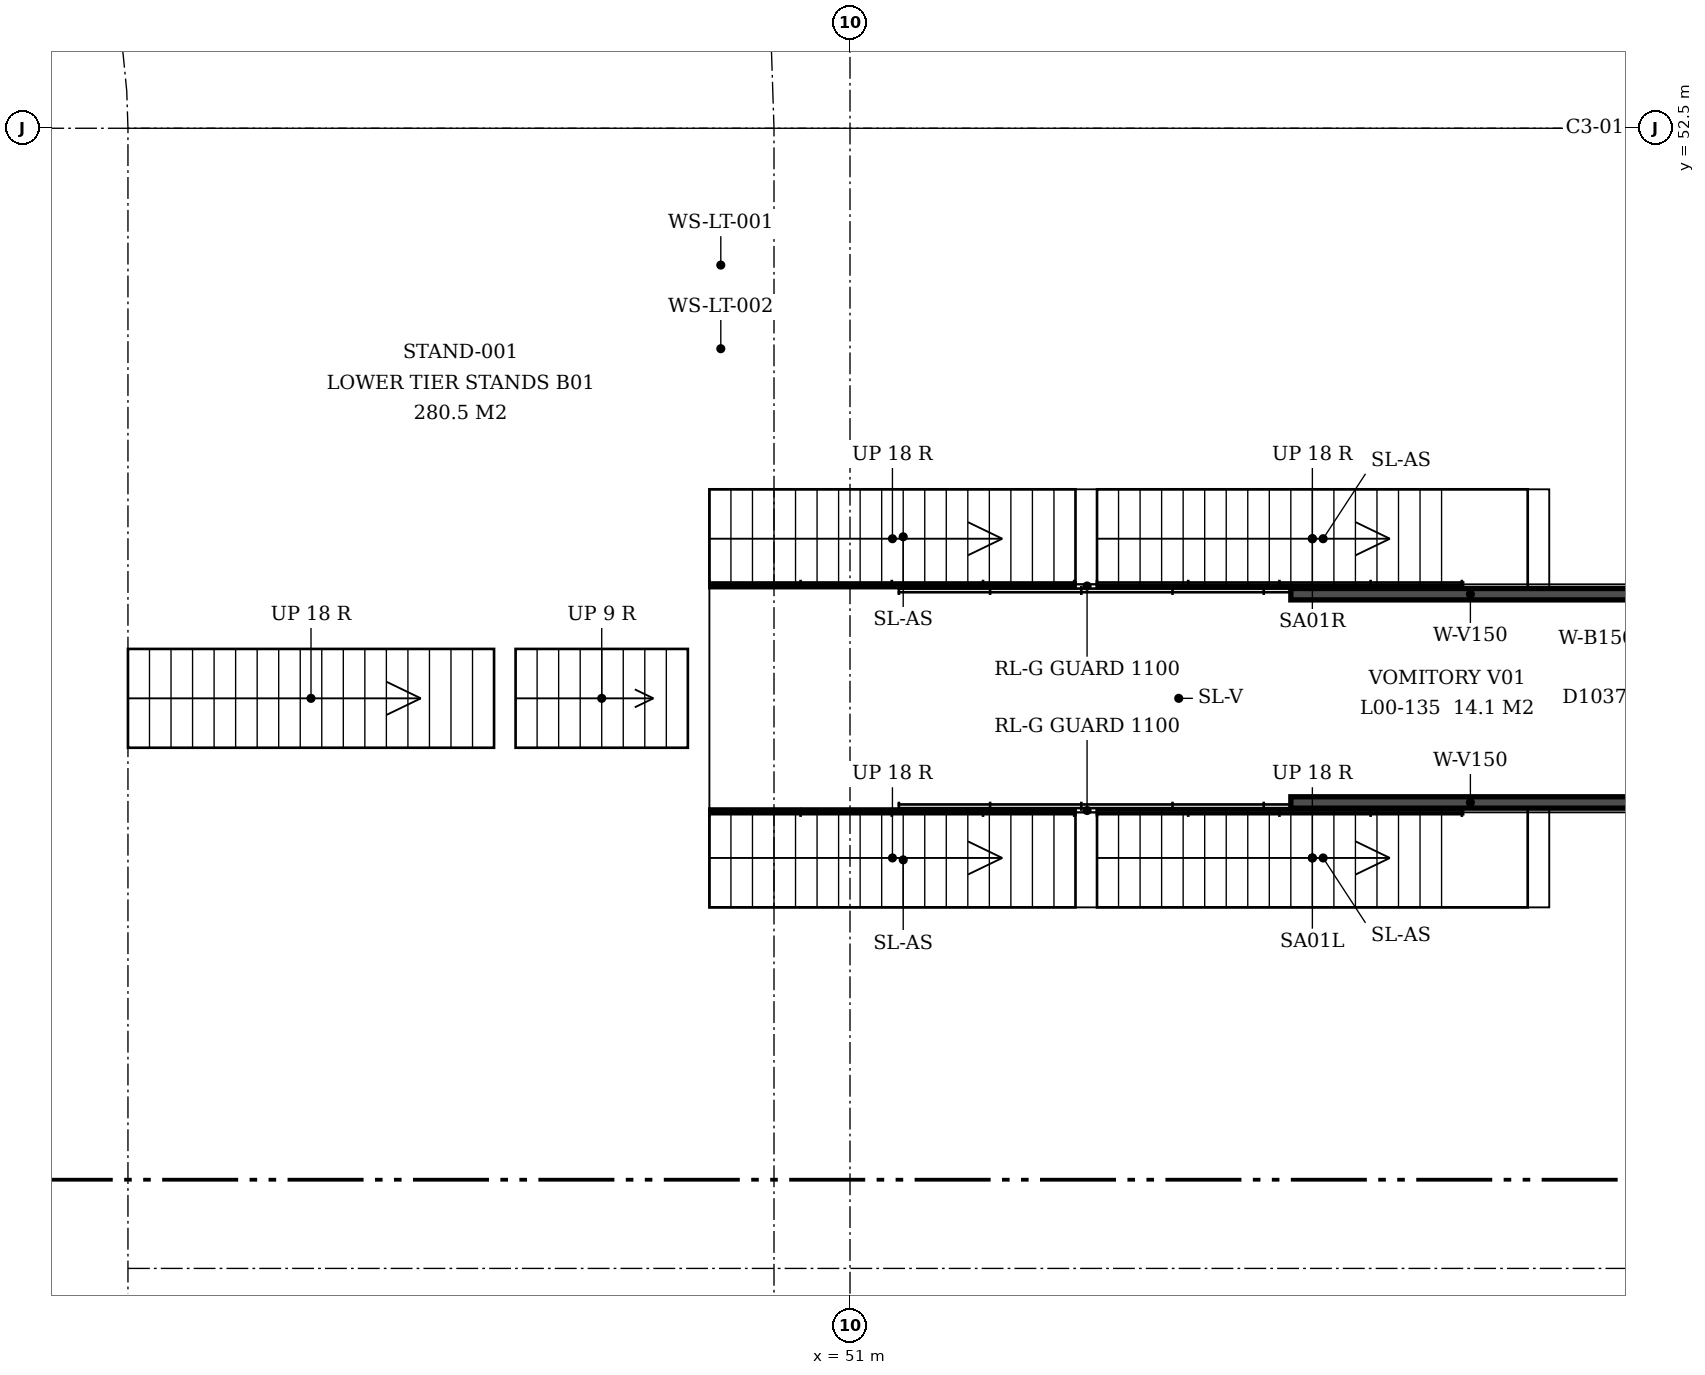
"""IFC4 building model, lengths in metres.
Left out: names, types, materials, properties, quantities, classifications, styles, units other than length and angle.
Written with IfcOpenShell. Run it as: python <this file> out.ifc"""

import sys

from ifc_helpers import new_model, si_unit, direction, frame, frame_2d, origin, place, context, subcontext, project, spatial, rectangle, extrude, element, save


model = new_model("IFC4")
c1 = context("Model", 3, precision=1e-05, world=origin(), true_north=direction((0.0, 1.0)))
c2 = subcontext(c1, "Body", "Model", "MODEL_VIEW")
j1 = project(units=[si_unit("LENGTHUNIT", "METRE"), si_unit("PLANEANGLEUNIT", "RADIAN")], contexts=[c1])
p1 = place(None, origin())
s1 = spatial("IfcSite", under=j1, at=p1, CompositionType="ELEMENT")
p2 = place(p1, origin())
s2 = spatial("IfcBuilding", under=s1, at=p2, CompositionType="ELEMENT")
p3 = place(p2, origin())
s3 = spatial("IfcBuildingStorey", under=s2, at=p3, CompositionType="ELEMENT", Elevation=0.0)
p4 = place(p3, frame((59.589, 62.612, 0.0), z_axis=(0.0, 0.0, 1.0), x_axis=(0.195091913691, -0.980784963798, 0.0)))
e1 = element("IfcWall", 1, at=p4, inside=s3, PredefinedType="SOLIDWALL", context=c2, shape_type="SweptSolid", body=[
    extrude(rectangle(XDim=9.902, YDim=0.15, at=frame_2d((4.951, 0.0))), origin(), (0.0, 0.0, 1.0), 3.0),
])
for number, where, z_axis, x_axis in (
    (2, (56.8, 43.63, 0.0), (0.0, 0.0, 1.0), (1.0, 0.0, 0.0)),
    (3, (56.8, 46.37, 0.0), (0.0, 0.0, 1.0), (1.0, 0.0, 0.0)),
):
    element("IfcWall", number, at=place(p3, frame(where, z_axis=z_axis, x_axis=x_axis)), inside=s3, PredefinedType="SOLIDWALL", context=c2, shape_type="SweptSolid", body=[
        extrude(rectangle(XDim=4.725, YDim=0.15, at=frame_2d((2.362, 0.0))), origin(), (0.0, 0.0, 1.0), 2.75),
    ])
save(model, sys.argv[1])
